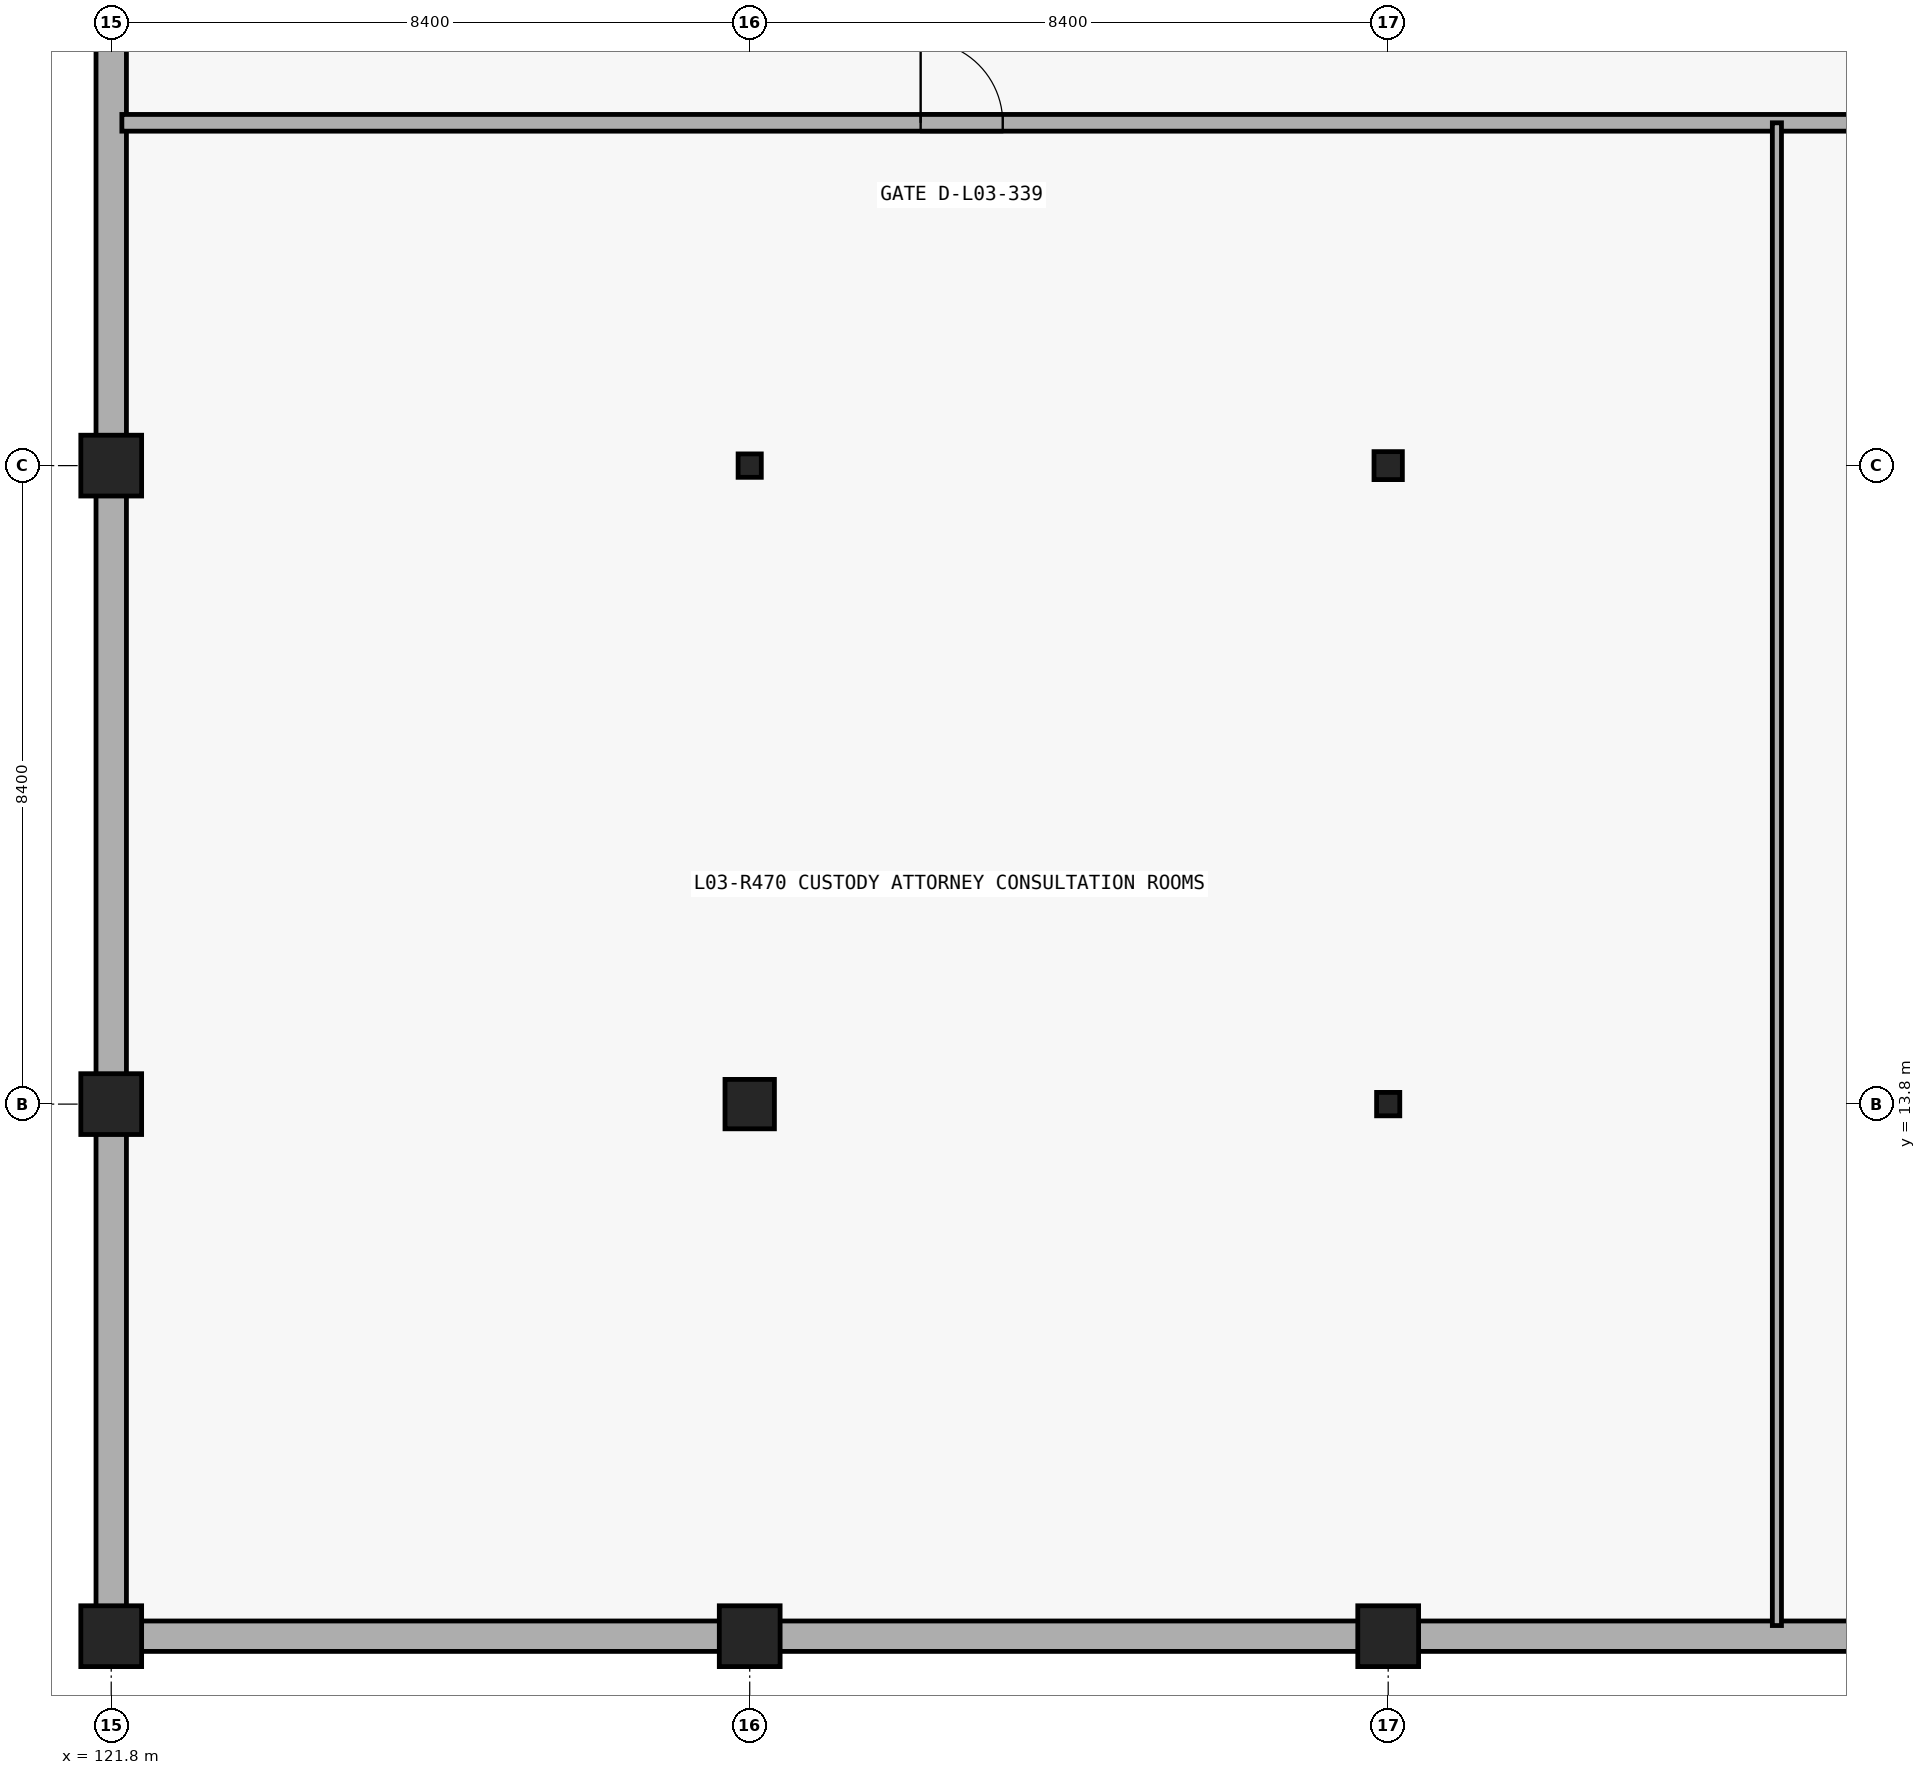
"""IFC4 building model, lengths in metres.
Left out: names, types, materials, properties, quantities, classifications, styles, units other than length and angle.
Written with IfcOpenShell. Run it as: python <this file> out.ifc"""

import sys

from ifc_helpers import new_model, si_unit, direction, frame, frame_2d, origin_with_axes, origin_2d_with_axis, place, context, subcontext, project, spatial, rectangle, circle, i_section, extrude, element, fill, save


model = new_model("IFC4")
c1 = context("Model", 3, precision=1e-05, world=origin_with_axes(), true_north=direction((0.0, 1.0)))
c2 = subcontext(c1, "Body", "Model", "MODEL_VIEW")
j1 = project(units=[si_unit("LENGTHUNIT", "METRE"), si_unit("PLANEANGLEUNIT", "RADIAN")], contexts=[c1])
p1 = place(None, origin_with_axes())
s1 = spatial("IfcSite", under=j1, at=p1, CompositionType="ELEMENT")
p2 = place(p1, origin_with_axes())
s2 = spatial("IfcBuilding", under=s1, at=p2, CompositionType="ELEMENT")
p3 = place(p2, frame((0.0, 0.0, 15.6), z_axis=(0.0, 0.0, 1.0), x_axis=(1.0, 0.0, 0.0)))
s3 = spatial("IfcBuildingStorey", under=s2, at=p3, CompositionType="ELEMENT", Elevation=15.6)
p4 = place(None, frame((121.8, 6.8, 15.6), z_axis=(0.0, 0.0, 1.0), x_axis=(1.0, 0.0, 0.0)))
e1 = element("IfcWall", 1, at=p4, inside=s3, PredefinedType="SOLIDWALL", context=c2, shape_type="SweptSolid", body=[
    extrude(rectangle(XDim=47.6, YDim=0.4, at=frame_2d((23.8, 0.0), x_axis=(1.0, 0.0))), origin_with_axes(), (0.0, 0.0, 1.0), 4.074),
])
p5 = place(None, frame((121.8, 54.34, 15.6), z_axis=(0.0, 0.0, 1.0), x_axis=(0.0, -1.0, 0.0)))
e2 = element("IfcWall", 2, at=p5, inside=s3, PredefinedType="SOLIDWALL", context=c2, shape_type="SweptSolid", body=[
    extrude(rectangle(XDim=47.28, YDim=0.4, at=frame_2d((23.64, 0.0), x_axis=(1.0, 0.0))), origin_with_axes(), (0.0, 0.0, 1.0), 4.114),
])
p6 = place(None, frame((121.94, 26.71, 15.6), z_axis=(0.0, 0.0, 1.0), x_axis=(1.0, 0.0, 0.0)))
e3 = element("IfcWall", 3, at=p6, inside=s3, PredefinedType="PARTITIONING", context=c2, shape_type="SweptSolid", body=[
    extrude(rectangle(XDim=47.32, YDim=0.22, at=frame_2d((23.66, 0.0), x_axis=(1.0, 0.0))), origin_with_axes(), (0.0, 0.0, 1.0), 4.48),
])
p7 = place(None, frame((132.989, 26.71, 15.6), z_axis=(0.0, 0.0, 1.0), x_axis=(1.0, 0.0, 0.0)))
e4 = element("IfcOpeningElement", 4, at=p7, cuts=e3, PredefinedType="OPENING", context=c2, shape_type="SweptSolid", body=[
    extrude(rectangle(XDim=1.08, YDim=2.18, at=frame_2d((0.0, 1.09), x_axis=(1.0, 0.0))), frame((0.0, 0.12, 0.0), z_axis=(0.0, -1.0, 0.0), x_axis=(1.0, 0.0, 0.0)), (0.0, 0.0, 1.0), 0.24),
])
p8 = place(None, frame((154.827, 26.71, 15.6), z_axis=(0.0, 0.0, 1.0), x_axis=(1.0, 0.0, 0.0)))
e5 = element("IfcOpeningElement", 5, at=p8, cuts=e3, PredefinedType="OPENING", context=c2, shape_type="SweptSolid", body=[
    extrude(rectangle(XDim=0.93, YDim=2.1, at=frame_2d((0.0, 1.05), x_axis=(1.0, 0.0))), frame((0.0, 0.12, 0.0), z_axis=(0.0, -1.0, 0.0), x_axis=(1.0, 0.0, 0.0)), (0.0, 0.0, 1.0), 0.24),
])
p9 = place(None, frame((167.438, 26.71, 15.6), z_axis=(0.0, 0.0, 1.0), x_axis=(1.0, 0.0, 0.0)))
e6 = element("IfcOpeningElement", 6, at=p9, cuts=e3, PredefinedType="OPENING", context=c2, shape_type="SweptSolid", body=[
    extrude(rectangle(XDim=0.95, YDim=2.1, at=frame_2d((0.0, 1.05), x_axis=(1.0, 0.0))), frame((0.0, 0.12, 0.0), z_axis=(0.0, -1.0, 0.0), x_axis=(1.0, 0.0, 0.0)), (0.0, 0.0, 1.0), 0.24),
])
p10 = place(None, frame((143.714, 6.94, 15.6), z_axis=(0.0, 0.0, 1.0), x_axis=(0.0, 1.0, 0.0)))
e7 = element("IfcWall", 7, at=p10, inside=s3, PredefinedType="PARTITIONING", context=c2, shape_type="SweptSolid", body=[
    extrude(rectangle(XDim=19.77, YDim=0.12, at=frame_2d((9.885, 0.0), x_axis=(1.0, 0.0))), origin_with_axes(), (0.0, 0.0, 1.0), 4.48),
])
for number, where, z_axis, x_axis in (
    (8, (121.8, 6.8, 15.6), (0.0, 0.0, 1.0), (1.0, 0.0, 0.0)),
    (9, (121.8, 13.8, 15.6), (0.0, 0.0, 1.0), (1.0, 0.0, 0.0)),
    (10, (121.8, 22.2, 15.6), (0.0, 0.0, 1.0), (1.0, 0.0, 0.0)),
    (11, (130.2, 6.8, 15.6), (0.0, 0.0, 1.0), (1.0, 0.0, 0.0)),
):
    element("IfcColumn", number, at=place(None, frame(where, z_axis=z_axis, x_axis=x_axis)), inside=s3, PredefinedType="COLUMN", context=c2, shape_type="SweptSolid", body=[
        extrude(circle(Radius=0.4, at=origin_2d_with_axis()), origin_with_axes(), (0.0, 0.0, 1.0), 4.8),
    ])
p11 = place(None, frame((130.2, 13.8, 15.6), z_axis=(0.0, 0.0, 1.0), x_axis=(1.0, 0.0, 0.0)))
e12 = element("IfcColumn", 12, at=p11, inside=s3, PredefinedType="COLUMN", context=c2, shape_type="SweptSolid", body=[
    extrude(rectangle(XDim=0.65, YDim=0.65, at=origin_2d_with_axis()), origin_with_axes(), (0.0, 0.0, 1.0), 4.8),
])
p12 = place(None, frame((130.2, 22.2, 15.6), z_axis=(0.0, 0.0, 1.0), x_axis=(1.0, 0.0, 0.0)))
e13 = element("IfcColumn", 13, at=p12, inside=s3, PredefinedType="COLUMN", context=c2, shape_type="SweptSolid", body=[
    extrude(i_section(OverallWidth=0.305, OverallDepth=0.308, WebThickness=0.01, FlangeThickness=0.015, at=origin_2d_with_axis()), origin_with_axes(), (0.0, 0.0, 1.0), 4.8),
])
p13 = place(None, frame((138.6, 6.8, 15.6), z_axis=(0.0, 0.0, 1.0), x_axis=(1.0, 0.0, 0.0)))
e14 = element("IfcColumn", 14, at=p13, inside=s3, PredefinedType="COLUMN", context=c2, shape_type="SweptSolid", body=[
    extrude(circle(Radius=0.4, at=origin_2d_with_axis()), origin_with_axes(), (0.0, 0.0, 1.0), 4.8),
])
p14 = place(None, frame((138.6, 13.8, 15.6), z_axis=(0.0, 0.0, 1.0), x_axis=(1.0, 0.0, 0.0)))
e15 = element("IfcColumn", 15, at=p14, inside=s3, PredefinedType="COLUMN", context=c2, shape_type="SweptSolid", body=[
    extrude(i_section(OverallWidth=0.305, OverallDepth=0.308, WebThickness=0.01, FlangeThickness=0.015, at=origin_2d_with_axis()), origin_with_axes(), (0.0, 0.0, 1.0), 4.8),
])
p15 = place(None, frame((138.6, 22.2, 15.6), z_axis=(0.0, 0.0, 1.0), x_axis=(1.0, 0.0, 0.0)))
e16 = element("IfcColumn", 16, at=p15, inside=s3, PredefinedType="COLUMN", context=c2, shape_type="SweptSolid", body=[
    extrude(i_section(OverallWidth=0.373, OverallDepth=0.368, WebThickness=0.015, FlangeThickness=0.024, at=origin_2d_with_axis()), origin_with_axes(), (0.0, 0.0, 1.0), 4.8),
])
p16 = place(None, frame((132.989, 26.71, 15.6), z_axis=(0.0, 0.0, 1.0), x_axis=(1.0, 0.0, 0.0)))
e17 = element("IfcDoor", 17, at=p16, inside=s3, OperationType="SINGLE_SWING_LEFT", PredefinedType="GATE", context=c2, shape_type="SweptSolid", body=[
    extrude(rectangle(XDim=1.08, YDim=2.18, at=frame_2d((0.0, 1.09), x_axis=(1.0, 0.0))), frame((0.0, 0.04, 0.0), z_axis=(0.0, -1.0, 0.0), x_axis=(1.0, 0.0, 0.0)), (0.0, 0.0, 1.0), 0.08),
])
fill(e4, e17)
save(model, sys.argv[1])
